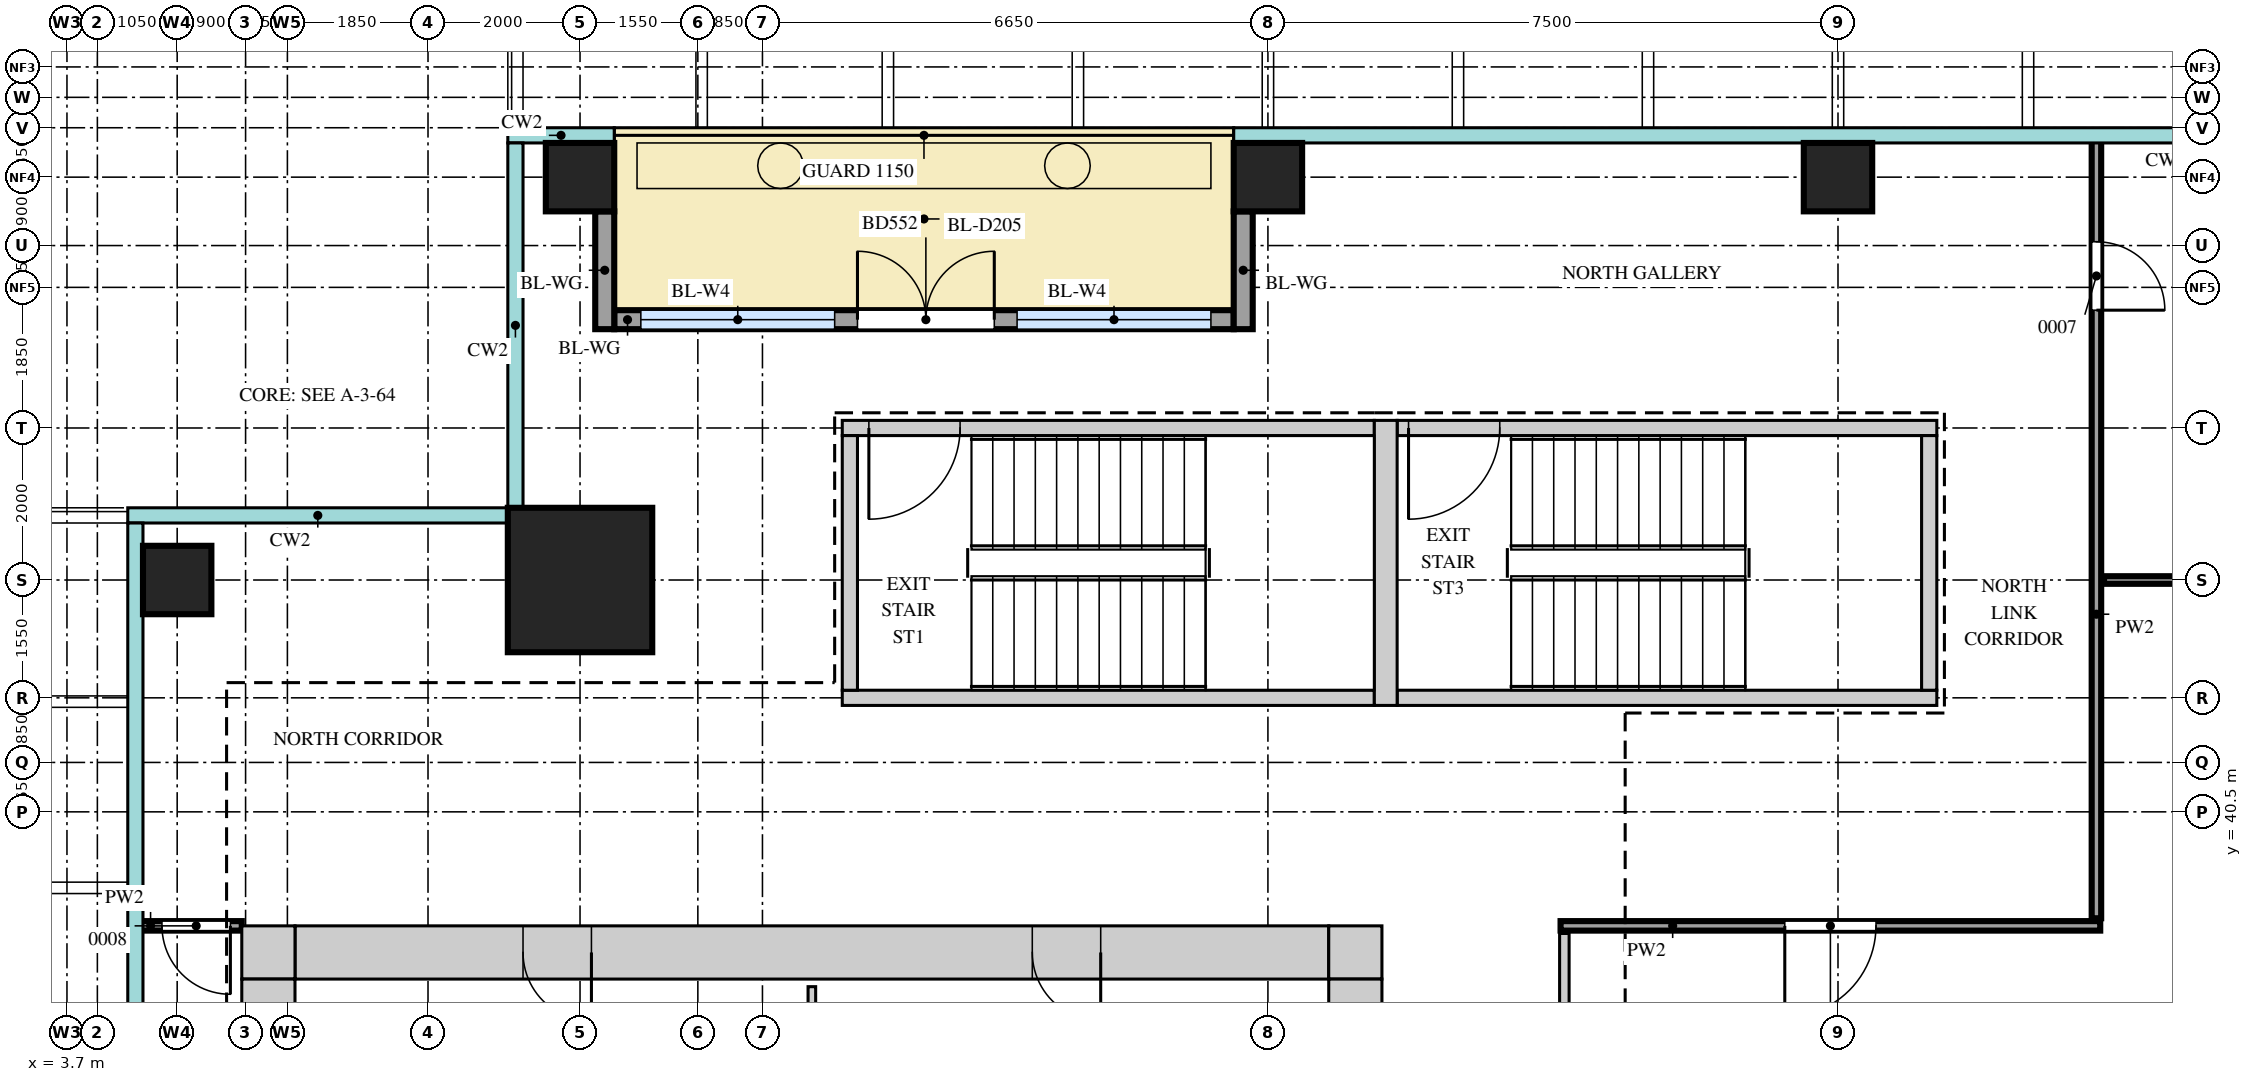
"""IFC4 building model, lengths in metres.
Left out: names, types, materials, properties, quantities, classifications, styles, units other than length and angle.
Written with IfcOpenShell. Run it as: python <this file> out.ifc"""

import sys

from ifc_helpers import new_model, si_unit, direction, frame, frame_2d, origin, origin_2d, place, context, subcontext, project, spatial, rectangle, extrude, source, transform, mapped, element, fill, save


model = new_model("IFC4")
c1 = context("Model", 3, precision=1e-05, world=origin(), true_north=direction((0.0, 1.0)))
c2 = subcontext(c1, "Body", "Model", "MODEL_VIEW")
j1 = project(units=[si_unit("LENGTHUNIT", "METRE"), si_unit("PLANEANGLEUNIT", "RADIAN")], contexts=[c1])
p1 = place(None, origin())
s1 = spatial("IfcSite", under=j1, at=p1, CompositionType="ELEMENT")
p2 = place(p1, origin())
s2 = spatial("IfcBuilding", under=s1, at=p2, CompositionType="ELEMENT")
p3 = place(p2, frame((0.0, 0.0, 246.2)))
s3 = spatial("IfcBuildingStorey", under=s2, at=p3, CompositionType="ELEMENT", Elevation=246.2)
m1 = source(origin(), c2, "Body", "SweptSolid", [
    extrude(rectangle(XDim=13.6, YDim=0.7, at=frame_2d((6.8, 0.0))), origin(), (0.0, 0.0, 1.0), 3.75),
])
p4 = place(p3, frame((6.7, 38.65, 0.0), z_axis=(0.0, 0.0, 1.0), x_axis=(1.0, 0.0, 0.0)))
e1 = element("IfcWall", 1, at=p4, inside=s3, PredefinedType="SHEAR", context=c2, shape_type="MappedRepresentation", body=[
    mapped(m1, transform((0.0, 0.0, 0.0))),
])
m2 = source(origin(), c2, "Body", "SweptSolid", [
    extrude(rectangle(XDim=0.9, YDim=2.1, at=frame_2d((0.45, 1.05))), frame((0.0, 0.36, 0.0), z_axis=(0.0, -1.0, 0.0), x_axis=(1.0, 0.0, 0.0)), (0.0, 0.0, 1.0), 0.72),
])
p5 = place(p4, frame((3.0, 0.0, 0.0)))
e2 = element("IfcOpeningElement", 2, at=p5, cuts=e1, PredefinedType="OPENING", context=c2, shape_type="MappedRepresentation", body=[
    mapped(m2, transform((0.0, 0.0, 0.0))),
])
p6 = place(p4, frame((9.7, 0.0, 0.0)))
e3 = element("IfcOpeningElement", 3, at=p6, cuts=e1, PredefinedType="OPENING", context=c2, shape_type="MappedRepresentation", body=[
    mapped(m2, transform((0.0, 0.0, 0.0))),
])
m3 = source(origin(), c2, "Body", "SweptSolid", [
    extrude(rectangle(XDim=0.7, YDim=0.7, at=frame_2d((0.35, 0.0))), origin(), (0.0, 0.0, 1.0), 3.75),
])
for number, where, z_axis, x_axis in (
    (4, (20.3, 38.65, 0.0), (0.0, 0.0, 1.0), (1.0, 0.0, 0.0)),
    (5, (6.0, 38.65, 0.0), (0.0, 0.0, 1.0), (1.0, 0.0, 0.0)),
):
    element("IfcWall", number, at=place(p3, frame(where, z_axis=z_axis, x_axis=x_axis)), inside=s3, PredefinedType="SHEAR", context=c2, shape_type="MappedRepresentation", body=[
        mapped(m3, transform((0.0, 0.0, 0.0))),
    ])
m4 = source(origin(), c2, "Body", "SweptSolid", [
    extrude(rectangle(XDim=22.6, YDim=0.7, at=frame_2d((11.3, 0.0))), origin(), (0.0, 0.0, 1.0), 3.75),
])
p7 = place(p3, frame((20.65, 15.7, 0.0), z_axis=(0.0, 0.0, 1.0), x_axis=(0.0, 1.0, 0.0)))
e6 = element("IfcWall", 6, at=p7, inside=s3, PredefinedType="SHEAR", context=c2, shape_type="MappedRepresentation", body=[
    mapped(m4, transform((0.0, 0.0, 0.0))),
])
m5 = source(origin(), c2, "Body", "SweptSolid", [
    extrude(rectangle(XDim=1.8, YDim=2.1, at=frame_2d((0.9, 1.05))), frame((0.0, 0.36, 0.0), z_axis=(0.0, -1.0, 0.0), x_axis=(1.0, 0.0, 0.0)), (0.0, 0.0, 1.0), 0.72),
])
p8 = place(p7, frame((10.8, 0.0, 0.0)))
e7 = element("IfcOpeningElement", 7, at=p8, cuts=e6, PredefinedType="OPENING", context=c2, shape_type="MappedRepresentation", body=[
    mapped(m5, transform((0.0, 0.0, 0.0))),
])
p9 = place(p7, frame((0.45, 0.0, 0.0)))
e8 = element("IfcOpeningElement", 8, at=p9, cuts=e6, PredefinedType="OPENING", context=c2, shape_type="MappedRepresentation", body=[
    mapped(m2, transform((0.0, 0.0, 0.0))),
])
p10 = place(p7, frame((2.9, 0.0, 0.0)))
e9 = element("IfcOpeningElement", 9, at=p10, cuts=e6, PredefinedType="OPENING", context=c2, shape_type="MappedRepresentation", body=[
    mapped(m2, transform((0.0, 0.0, 0.0))),
])
p11 = place(p7, frame((5.65, 0.0, 0.0)))
e10 = element("IfcOpeningElement", 10, at=p11, cuts=e6, PredefinedType="OPENING", context=c2, shape_type="MappedRepresentation", body=[
    mapped(m2, transform((0.0, 0.0, 0.0))),
])
p12 = place(p3, frame((6.35, 15.7, 0.0), z_axis=(0.0, 0.0, 1.0), x_axis=(0.0, 1.0, 0.0)))
e11 = element("IfcWall", 11, at=p12, inside=s3, PredefinedType="SHEAR", context=c2, shape_type="MappedRepresentation", body=[
    mapped(m4, transform((0.0, 0.0, 0.0))),
])
m6 = source(origin(), c2, "Body", "SweptSolid", [
    extrude(rectangle(XDim=7.0, YDim=0.2, at=frame_2d((3.5, 0.0))), origin(), (0.0, 0.0, 1.0), 3.75),
])
p13 = place(p3, frame((13.9, 45.55, 0.0), z_axis=(0.0, 0.0, 1.0), x_axis=(1.0, 0.0, 0.0)))
e12 = element("IfcWall", 12, at=p13, inside=s3, PredefinedType="SHEAR", context=c2, shape_type="MappedRepresentation", body=[
    mapped(m6, transform((0.0, 0.0, 0.0))),
])
m7 = source(origin(), c2, "Body", "SweptSolid", [
    extrude(rectangle(XDim=1.2, YDim=2.1, at=frame_2d((0.6, 1.05))), frame((0.0, 0.11, 0.0), z_axis=(0.0, -1.0, 0.0), x_axis=(1.0, 0.0, 0.0)), (0.0, 0.0, 1.0), 0.22),
])
p14 = place(p13, frame((0.35, 0.0, 0.0)))
e13 = element("IfcOpeningElement", 13, at=p14, cuts=e12, PredefinedType="OPENING", context=c2, shape_type="MappedRepresentation", body=[
    mapped(m7, transform((0.0, 0.0, 0.0))),
])
p15 = place(p3, frame((13.9, 42.0, 0.0), z_axis=(0.0, 0.0, 1.0), x_axis=(1.0, 0.0, 0.0)))
e14 = element("IfcWall", 14, at=p15, inside=s3, PredefinedType="SHEAR", context=c2, shape_type="MappedRepresentation", body=[
    mapped(m6, transform((0.0, 0.0, 0.0))),
])
m8 = source(origin(), c2, "Body", "SweptSolid", [
    extrude(rectangle(XDim=7.1, YDim=0.2, at=frame_2d((3.55, 0.0))), origin(), (0.0, 0.0, 1.0), 3.75),
])
p16 = place(p3, frame((21.2, 45.55, 0.0), z_axis=(0.0, 0.0, 1.0), x_axis=(1.0, 0.0, 0.0)))
e15 = element("IfcWall", 15, at=p16, inside=s3, PredefinedType="SHEAR", context=c2, shape_type="MappedRepresentation", body=[
    mapped(m8, transform((0.0, 0.0, 0.0))),
])
p17 = place(p16, frame((0.15, 0.0, 0.0)))
e16 = element("IfcOpeningElement", 16, at=p17, cuts=e15, PredefinedType="OPENING", context=c2, shape_type="MappedRepresentation", body=[
    mapped(m7, transform((0.0, 0.0, 0.0))),
])
p18 = place(p3, frame((21.2, 42.0, 0.0), z_axis=(0.0, 0.0, 1.0), x_axis=(1.0, 0.0, 0.0)))
e17 = element("IfcWall", 17, at=p18, inside=s3, PredefinedType="SHEAR", context=c2, shape_type="MappedRepresentation", body=[
    mapped(m8, transform((0.0, 0.0, 0.0))),
])
m9 = source(origin(), c2, "Body", "SweptSolid", [
    extrude(rectangle(XDim=3.75, YDim=0.3, at=frame_2d((1.875, 0.0))), origin(), (0.0, 0.0, 1.0), 3.75),
])
p19 = place(p3, frame((21.05, 41.9, 0.0), z_axis=(0.0, 0.0, 1.0), x_axis=(0.0, 1.0, 0.0)))
e18 = element("IfcWall", 18, at=p19, inside=s3, PredefinedType="SHEAR", context=c2, shape_type="MappedRepresentation", body=[
    mapped(m9, transform((0.0, 0.0, 0.0))),
])
m10 = source(origin(), c2, "Body", "SweptSolid", [
    extrude(rectangle(XDim=3.35, YDim=0.2, at=frame_2d((1.675, 0.0))), origin(), (0.0, 0.0, 1.0), 3.75),
])
for number, where, z_axis, x_axis in (
    (19, (14.0, 42.1, 0.0), (0.0, 0.0, 1.0), (0.0, 1.0, 0.0)),
    (20, (28.2, 42.1, 0.0), (0.0, 0.0, 1.0), (0.0, 1.0, 0.0)),
):
    element("IfcWall", number, at=place(p3, frame(where, z_axis=z_axis, x_axis=x_axis)), inside=s3, PredefinedType="SHEAR", context=c2, shape_type="MappedRepresentation", body=[
        mapped(m10, transform((0.0, 0.0, 0.0))),
    ])
m11 = source(origin(), c2, "Body", "SweptSolid", [
    extrude(rectangle(XDim=1.9, YDim=1.9, at=origin_2d()), origin(), (0.0, 0.0, 1.0), 4.0),
])
p20 = place(p3, frame((10.45, 43.55, 0.0), z_axis=(0.0, 0.0, 1.0), x_axis=(1.0, 0.0, 0.0)))
e21 = element("IfcColumn", 21, at=p20, inside=s3, PredefinedType="COLUMN", context=c2, shape_type="MappedRepresentation", body=[
    mapped(m11, transform((0.0, 0.0, 0.0))),
])
m12 = source(origin(), c2, "Body", "SweptSolid", [
    extrude(rectangle(XDim=0.9, YDim=0.9, at=origin_2d()), origin(), (0.0, 0.0, 1.0), 3.75),
])
for number, where, z_axis, x_axis in (
    (22, (10.45, 48.85, 0.0), (0.0, 0.0, 1.0), (1.0, 0.0, 0.0)),
    (23, (19.5, 48.85, 0.0), (0.0, 0.0, 1.0), (1.0, 0.0, 0.0)),
    (24, (27.0, 48.85, 0.0), (0.0, 0.0, 1.0), (1.0, 0.0, 0.0)),
    (25, (5.15, 43.55, 0.0), (0.0, 0.0, 1.0), (1.0, 0.0, 0.0)),
):
    element("IfcColumn", number, at=place(p3, frame(where, z_axis=z_axis, x_axis=x_axis)), inside=s3, PredefinedType="COLUMN", context=c2, shape_type="MappedRepresentation", body=[
        mapped(m12, transform((0.0, 0.0, 0.0))),
    ])
m13 = source(origin(), c2, "Body", "SweptSolid", [
    extrude(rectangle(XDim=8.15, YDim=0.25, at=frame_2d((4.075, 0.0))), origin(), (0.0, 0.0, 1.0), 3.35),
])
p21 = place(p3, frame((10.9, 46.975, 0.0), z_axis=(0.0, 0.0, 1.0), x_axis=(1.0, 0.0, 0.0)))
e26 = element("IfcWall", 26, at=p21, inside=s3, PredefinedType="SOLIDWALL", context=c2, shape_type="MappedRepresentation", body=[
    mapped(m13, transform((0.0, 0.0, 0.0))),
])
m14 = source(origin(), c2, "Body", "SweptSolid", [
    extrude(rectangle(XDim=2.55, YDim=2.4, at=frame_2d((1.275, 1.2))), frame((0.0, 0.135, 0.0), z_axis=(0.0, -1.0, 0.0), x_axis=(1.0, 0.0, 0.0)), (0.0, 0.0, 1.0), 0.27),
])
p22 = place(p21, frame((0.35, 0.0, 0.0)))
e27 = element("IfcOpeningElement", 27, at=p22, cuts=e26, PredefinedType="OPENING", context=c2, shape_type="MappedRepresentation", body=[
    mapped(m14, transform((0.0, 0.0, 0.0))),
])
p23 = place(p21, frame((5.3, 0.0, 0.0)))
e28 = element("IfcOpeningElement", 28, at=p23, cuts=e26, PredefinedType="OPENING", context=c2, shape_type="MappedRepresentation", body=[
    mapped(m14, transform((0.0, 0.0, 0.0))),
])
m15 = source(origin(), c2, "Body", "SweptSolid", [
    extrude(rectangle(XDim=1.8, YDim=2.4, at=frame_2d((0.9, 1.2))), frame((0.0, 0.135, 0.0), z_axis=(0.0, -1.0, 0.0), x_axis=(1.0, 0.0, 0.0)), (0.0, 0.0, 1.0), 0.27),
])
p24 = place(p21, frame((3.2, 0.0, 0.0)))
e29 = element("IfcOpeningElement", 29, at=p24, cuts=e26, PredefinedType="OPENING", context=c2, shape_type="MappedRepresentation", body=[
    mapped(m15, transform((0.0, 0.0, 0.0))),
])
m16 = source(origin(), c2, "Body", "SweptSolid", [
    extrude(rectangle(XDim=1.55, YDim=0.25, at=frame_2d((0.775, 0.0))), origin(), (0.0, 0.0, 1.0), 3.35),
])
for number, where, z_axis, x_axis in (
    (30, (10.775, 48.4, 0.0), (0.0, 0.0, 1.0), (0.0, -1.0, 0.0)),
    (31, (19.175, 48.4, 0.0), (0.0, 0.0, 1.0), (0.0, -1.0, 0.0)),
):
    element("IfcWall", number, at=place(p3, frame(where, z_axis=z_axis, x_axis=x_axis)), inside=s3, PredefinedType="SOLIDWALL", context=c2, shape_type="MappedRepresentation", body=[
        mapped(m16, transform((0.0, 0.0, 0.0))),
    ])
m17 = source(origin(), c2, "Body", "SweptSolid", [
    extrude(rectangle(XDim=20.8, YDim=0.125, at=frame_2d((10.4, 0.0))), origin(), (0.0, 0.0, 1.0), 3.8),
])
p25 = place(p3, frame((23.4, 18.1, 0.0), z_axis=(0.0, 0.0, 1.0), x_axis=(0.0, 1.0, 0.0)))
e32 = element("IfcWall", 32, at=p25, inside=s3, PredefinedType="PARTITIONING", context=c2, shape_type="MappedRepresentation", body=[
    mapped(m17, transform((0.0, 0.0, 0.0))),
])
m18 = source(origin(), c2, "Body", "SweptSolid", [
    extrude(rectangle(XDim=1.2, YDim=2.1, at=frame_2d((0.6, 1.05))), frame((0.0, 0.073, 0.0), z_axis=(0.0, -1.0, 0.0), x_axis=(1.0, 0.0, 0.0)), (0.0, 0.0, 1.0), 0.145),
])
p26 = place(p25, frame((12.05, 0.0, 0.0)))
e33 = element("IfcOpeningElement", 33, at=p26, cuts=e32, PredefinedType="OPENING", context=c2, shape_type="MappedRepresentation", body=[
    mapped(m18, transform((0.0, 0.0, 0.0))),
])
m19 = source(origin(), c2, "Body", "SweptSolid", [
    extrude(rectangle(XDim=6.0, YDim=0.1, at=frame_2d((3.0, 0.0))), origin(), (0.0, 0.0, 1.0), 3.8),
])
p27 = place(p3, frame((13.5, 32.2, 0.0), z_axis=(0.0, 0.0, 1.0), x_axis=(0.0, 1.0, 0.0)))
e34 = element("IfcWall", 34, at=p27, inside=s3, PredefinedType="PARTITIONING", context=c2, shape_type="MappedRepresentation", body=[
    mapped(m19, transform((0.0, 0.0, 0.0))),
])
m20 = source(origin(), c2, "Body", "SweptSolid", [
    extrude(rectangle(XDim=1.35, YDim=0.125, at=frame_2d((0.675, 0.0))), origin(), (0.0, 0.0, 1.0), 3.8),
])
p28 = place(p3, frame((4.65, 39.0, 0.0), z_axis=(0.0, 0.0, 1.0), x_axis=(1.0, 0.0, 0.0)))
e35 = element("IfcWall", 35, at=p28, inside=s3, PredefinedType="PARTITIONING", context=c2, shape_type="MappedRepresentation", body=[
    mapped(m20, transform((0.0, 0.0, 0.0))),
])
m21 = source(origin(), c2, "Body", "SweptSolid", [
    extrude(rectangle(XDim=0.9, YDim=2.1, at=frame_2d((0.45, 1.05))), frame((0.0, 0.073, 0.0), z_axis=(0.0, -1.0, 0.0), x_axis=(1.0, 0.0, 0.0)), (0.0, 0.0, 1.0), 0.145),
])
p29 = place(p28, frame((0.3, 0.0, 0.0)))
e36 = element("IfcOpeningElement", 36, at=p29, cuts=e35, PredefinedType="OPENING", context=c2, shape_type="MappedRepresentation", body=[
    mapped(m21, transform((0.0, 0.0, 0.0))),
])
m22 = source(origin(), c2, "Body", "SweptSolid", [
    extrude(rectangle(XDim=7.1, YDim=0.125, at=frame_2d((3.55, 0.0))), origin(), (0.0, 0.0, 1.0), 3.8),
])
p30 = place(p3, frame((23.35, 39.0, 0.0), z_axis=(0.0, 0.0, 1.0), x_axis=(1.0, 0.0, 0.0)))
e37 = element("IfcWall", 37, at=p30, inside=s3, PredefinedType="PARTITIONING", context=c2, shape_type="MappedRepresentation", body=[
    mapped(m22, transform((0.0, 0.0, 0.0))),
])
p31 = place(p30, frame((2.95, 0.0, 0.0)))
e38 = element("IfcOpeningElement", 38, at=p31, cuts=e37, PredefinedType="OPENING", context=c2, shape_type="MappedRepresentation", body=[
    mapped(m18, transform((0.0, 0.0, 0.0))),
])
m23 = source(origin(), c2, "Body", "SweptSolid", [
    extrude(rectangle(XDim=10.25, YDim=0.125, at=frame_2d((5.125, 0.0))), origin(), (0.0, 0.0, 1.0), 3.8),
])
p32 = place(p3, frame((30.4, 39.1, 0.0), z_axis=(0.0, 0.0, 1.0), x_axis=(0.0, 1.0, 0.0)))
e39 = element("IfcWall", 39, at=p32, inside=s3, PredefinedType="PARTITIONING", context=c2, shape_type="MappedRepresentation", body=[
    mapped(m23, transform((0.0, 0.0, 0.0))),
])
p33 = place(p32, frame((8.0, 0.0, 0.0)))
e40 = element("IfcOpeningElement", 40, at=p33, cuts=e39, PredefinedType="OPENING", context=c2, shape_type="MappedRepresentation", body=[
    mapped(m21, transform((0.0, 0.0, 0.0))),
])
m24 = source(origin(), c2, "Body", "SweptSolid", [
    extrude(rectangle(XDim=18.85, YDim=0.1, at=frame_2d((9.425, 0.0))), origin(), (0.0, 0.0, 1.0), 3.3),
])
p34 = place(p3, frame((30.5, 43.55, 0.0), z_axis=(0.0, 0.0, 1.0), x_axis=(1.0, 0.0, 0.0)))
e41 = element("IfcWall", 41, at=p34, inside=s3, PredefinedType="PARTITIONING", context=c2, shape_type="MappedRepresentation", body=[
    mapped(m24, transform((0.0, 0.0, 0.0))),
])
m25 = source(origin(), c2, "Body", "SweptSolid", [
    extrude(rectangle(XDim=2.55, YDim=2.4, at=frame_2d((1.275, 1.2))), frame((0.0, 0.03, 0.0), z_axis=(0.0, -1.0, 0.0), x_axis=(1.0, 0.0, 0.0)), (0.0, 0.0, 1.0), 0.06),
])
p35 = place(p22, origin())
e42 = element("IfcWindow", 42, at=p35, inside=s3, PartitioningType="SINGLE_PANEL", PredefinedType="WINDOW", context=c2, shape_type="MappedRepresentation", body=[
    mapped(m25, transform((0.0, 0.0, 0.0))),
])
fill(e27, e42)
p36 = place(p23, origin())
e43 = element("IfcWindow", 43, at=p36, inside=s3, PartitioningType="SINGLE_PANEL", PredefinedType="WINDOW", context=c2, shape_type="MappedRepresentation", body=[
    mapped(m25, transform((0.0, 0.0, 0.0))),
])
fill(e28, e43)
m26 = source(origin(), c2, "Body", "SweptSolid", [
    extrude(rectangle(XDim=1.8, YDim=2.4, at=frame_2d((0.9, 1.2))), frame((0.0, 0.025, 0.0), z_axis=(0.0, -1.0, 0.0), x_axis=(1.0, 0.0, 0.0)), (0.0, 0.0, 1.0), 0.05),
])
p37 = place(p24, origin())
e44 = element("IfcDoor", 44, at=p37, inside=s3, OperationType="DOUBLE_DOOR_DOUBLE_SWING", PredefinedType="DOOR", context=c2, shape_type="MappedRepresentation", body=[
    mapped(m26, transform((0.0, 0.0, 0.0))),
])
fill(e29, e44)
m27 = source(origin(), c2, "Body", "SweptSolid", [
    extrude(rectangle(XDim=0.9, YDim=2.1, at=frame_2d((0.45, 1.05))), frame((0.0, 0.3, 0.0), z_axis=(0.0, -1.0, 0.0), x_axis=(1.0, 0.0, 0.0)), (0.0, 0.0, 1.0), 0.6),
])
p38 = place(p5, origin())
e45 = element("IfcDoor", 45, at=p38, inside=s3, OperationType="SINGLE_SWING_RIGHT", PredefinedType="DOOR", context=c2, shape_type="MappedRepresentation", body=[
    mapped(m27, transform((0.0, 0.0, 0.0))),
])
fill(e2, e45)
p39 = place(p6, origin())
e46 = element("IfcDoor", 46, at=p39, inside=s3, OperationType="SINGLE_SWING_RIGHT", PredefinedType="DOOR", context=c2, shape_type="MappedRepresentation", body=[
    mapped(m27, transform((0.0, 0.0, 0.0))),
])
fill(e3, e46)
m28 = source(origin(), c2, "Body", "SweptSolid", [
    extrude(rectangle(XDim=0.9, YDim=2.1, at=frame_2d((0.45, 1.05))), frame((0.0, 0.025, 0.0), z_axis=(0.0, -1.0, 0.0), x_axis=(1.0, 0.0, 0.0)), (0.0, 0.0, 1.0), 0.05),
])
p40 = place(p29, origin())
e47 = element("IfcDoor", 47, at=p40, inside=s3, OperationType="SINGLE_SWING_RIGHT", PredefinedType="DOOR", context=c2, shape_type="MappedRepresentation", body=[
    mapped(m28, transform((0.0, 0.0, 0.0))),
])
fill(e36, e47)
m29 = source(origin(), c2, "Body", "SweptSolid", [
    extrude(rectangle(XDim=1.2, YDim=2.1, at=frame_2d((0.6, 1.05))), frame((0.0, 0.025, 0.0), z_axis=(0.0, -1.0, 0.0), x_axis=(1.0, 0.0, 0.0)), (0.0, 0.0, 1.0), 0.05),
])
p41 = place(p31, origin())
e48 = element("IfcDoor", 48, at=p41, inside=s3, OperationType="SINGLE_SWING_LEFT", PredefinedType="DOOR", context=c2, shape_type="MappedRepresentation", body=[
    mapped(m29, transform((0.0, 0.0, 0.0))),
])
fill(e38, e48)
p42 = place(p33, origin())
e49 = element("IfcDoor", 49, at=p42, inside=s3, OperationType="SINGLE_SWING_LEFT", PredefinedType="DOOR", context=c2, shape_type="MappedRepresentation", body=[
    mapped(m28, transform((0.0, 0.0, 0.0))),
])
fill(e40, e49)
p43 = place(p14, origin())
e50 = element("IfcDoor", 50, at=p43, inside=s3, OperationType="SINGLE_SWING_LEFT", PredefinedType="DOOR", context=c2, shape_type="MappedRepresentation", body=[
    mapped(m29, transform((0.0, 0.0, 0.0))),
])
fill(e13, e50)
p44 = place(p17, origin())
e51 = element("IfcDoor", 51, at=p44, inside=s3, OperationType="SINGLE_SWING_LEFT", PredefinedType="DOOR", context=c2, shape_type="MappedRepresentation", body=[
    mapped(m29, transform((0.0, 0.0, 0.0))),
])
fill(e16, e51)
save(model, sys.argv[1])
